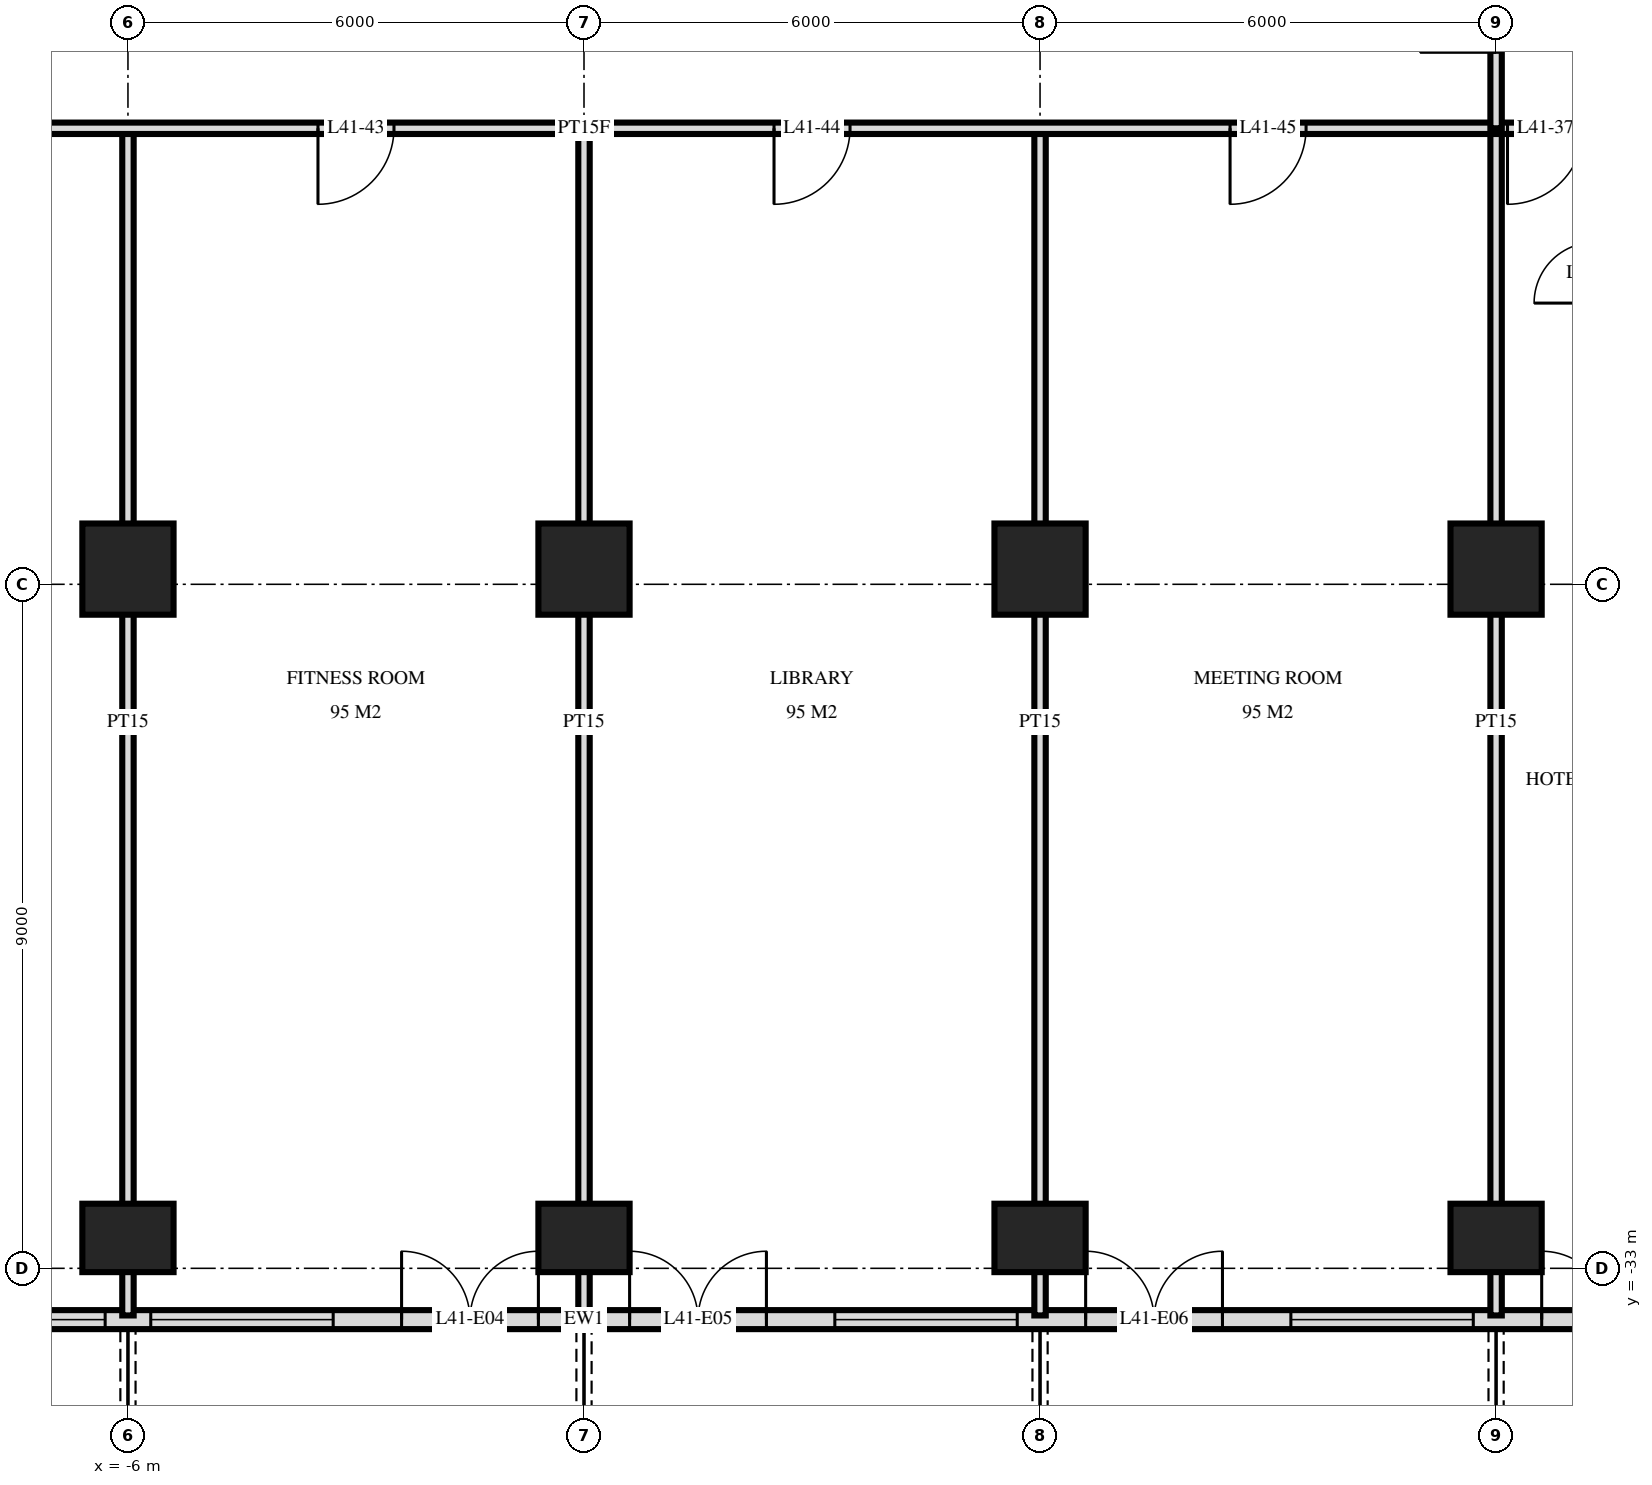
"""IFC4 building model, lengths in metres.
Left out: names, types, materials, properties, quantities, classifications, styles, units other than length and angle.
Written with IfcOpenShell. Run it as: python <this file> out.ifc"""

import sys

from ifc_helpers import new_model, si_unit, direction, frame, frame_2d, origin, origin_2d, place, context, subcontext, project, spatial, rectangle, extrude, element, fill, save


model = new_model("IFC4")
c1 = context("Model", 3, precision=1e-05, world=origin(), true_north=direction((0.0, 1.0)))
c2 = subcontext(c1, "Body", "Model", "MODEL_VIEW")
j1 = project(units=[si_unit("LENGTHUNIT", "METRE"), si_unit("PLANEANGLEUNIT", "RADIAN")], contexts=[c1])
p1 = place(None, origin())
s1 = spatial("IfcSite", under=j1, at=p1, CompositionType="ELEMENT")
p2 = place(p1, origin())
s2 = spatial("IfcBuilding", under=s1, at=p2, CompositionType="ELEMENT")
p3 = place(p2, frame((0.0, 0.0, 159.6)))
s3 = spatial("IfcBuildingStorey", under=s2, at=p3, CompositionType="ELEMENT", Elevation=159.6)
p4 = place(p3, frame((-6.0, -32.6, 0.0), z_axis=(0.0, 0.0, 1.0), x_axis=(1.0, 0.0, 0.0)))
e1 = element("IfcColumn", 1, at=p4, inside=s3, PredefinedType="COLUMN", context=c2, shape_type="SweptSolid", body=[
    extrude(rectangle(XDim=1.2, YDim=0.9, at=origin_2d()), origin(), (0.0, 0.0, 1.0), 3.6),
])
p5 = place(p3, frame((-6.0, -23.8, 0.0), z_axis=(0.0, 0.0, 1.0), x_axis=(1.0, 0.0, 0.0)))
e2 = element("IfcColumn", 2, at=p5, inside=s3, PredefinedType="COLUMN", context=c2, shape_type="SweptSolid", body=[
    extrude(rectangle(XDim=1.2, YDim=1.2, at=origin_2d()), origin(), (0.0, 0.0, 1.0), 3.6),
])
p6 = place(p3, frame((0.0, -32.6, 0.0), z_axis=(0.0, 0.0, 1.0), x_axis=(1.0, 0.0, 0.0)))
e3 = element("IfcColumn", 3, at=p6, inside=s3, PredefinedType="COLUMN", context=c2, shape_type="SweptSolid", body=[
    extrude(rectangle(XDim=1.2, YDim=0.9, at=origin_2d()), origin(), (0.0, 0.0, 1.0), 3.6),
])
p7 = place(p3, frame((0.0, -23.8, 0.0), z_axis=(0.0, 0.0, 1.0), x_axis=(1.0, 0.0, 0.0)))
e4 = element("IfcColumn", 4, at=p7, inside=s3, PredefinedType="COLUMN", context=c2, shape_type="SweptSolid", body=[
    extrude(rectangle(XDim=1.2, YDim=1.2, at=origin_2d()), origin(), (0.0, 0.0, 1.0), 3.6),
])
p8 = place(p3, frame((6.0, -32.6, 0.0), z_axis=(0.0, 0.0, 1.0), x_axis=(1.0, 0.0, 0.0)))
e5 = element("IfcColumn", 5, at=p8, inside=s3, PredefinedType="COLUMN", context=c2, shape_type="SweptSolid", body=[
    extrude(rectangle(XDim=1.2, YDim=0.9, at=origin_2d()), origin(), (0.0, 0.0, 1.0), 3.6),
])
p9 = place(p3, frame((6.0, -23.8, 0.0), z_axis=(0.0, 0.0, 1.0), x_axis=(1.0, 0.0, 0.0)))
e6 = element("IfcColumn", 6, at=p9, inside=s3, PredefinedType="COLUMN", context=c2, shape_type="SweptSolid", body=[
    extrude(rectangle(XDim=1.2, YDim=1.2, at=origin_2d()), origin(), (0.0, 0.0, 1.0), 3.6),
])
p10 = place(p3, frame((12.0, -32.6, 0.0), z_axis=(0.0, 0.0, 1.0), x_axis=(1.0, 0.0, 0.0)))
e7 = element("IfcColumn", 7, at=p10, inside=s3, PredefinedType="COLUMN", context=c2, shape_type="SweptSolid", body=[
    extrude(rectangle(XDim=1.2, YDim=0.9, at=origin_2d()), origin(), (0.0, 0.0, 1.0), 3.6),
])
p11 = place(p3, frame((12.0, -23.8, 0.0), z_axis=(0.0, 0.0, 1.0), x_axis=(1.0, 0.0, 0.0)))
e8 = element("IfcColumn", 8, at=p11, inside=s3, PredefinedType="COLUMN", context=c2, shape_type="SweptSolid", body=[
    extrude(rectangle(XDim=1.2, YDim=1.2, at=origin_2d()), origin(), (0.0, 0.0, 1.0), 3.6),
])
p12 = place(p3, frame((-23.675, -33.675, 0.0), z_axis=(0.0, 0.0, 1.0), x_axis=(1.0, 0.0, 0.0)))
e9 = element("IfcWall", 9, at=p12, inside=s3, PredefinedType="SOLIDWALL", context=c2, shape_type="SweptSolid", body=[
    extrude(rectangle(XDim=47.351, YDim=0.25, at=frame_2d((23.675, 0.0))), origin(), (0.0, 0.0, 1.0), 3.32),
])
p13 = place(p12, frame((0.575, 0.0, 0.0)))
e10 = element("IfcOpeningElement", 10, at=p13, cuts=e9, PredefinedType="OPENING", context=c2, shape_type="SweptSolid", body=[
    extrude(rectangle(XDim=1.8, YDim=2.4, at=frame_2d((0.9, 1.2))), frame((0.0, 0.135, 0.0), z_axis=(0.0, -1.0, 0.0), x_axis=(1.0, 0.0, 0.0)), (0.0, 0.0, 1.0), 0.27),
])
p14 = place(p12, frame((3.425, 0.0, 0.3)))
e11 = element("IfcOpeningElement", 11, at=p14, cuts=e9, PredefinedType="OPENING", context=c2, shape_type="SweptSolid", body=[
    extrude(rectangle(XDim=1.8, YDim=2.1, at=frame_2d((0.9, 1.05))), frame((0.0, 0.135, 0.0), z_axis=(0.0, -1.0, 0.0), x_axis=(1.0, 0.0, 0.0)), (0.0, 0.0, 1.0), 0.27),
])
p15 = place(p12, frame((5.975, 0.0, 0.3)))
e12 = element("IfcOpeningElement", 12, at=p15, cuts=e9, PredefinedType="OPENING", context=c2, shape_type="SweptSolid", body=[
    extrude(rectangle(XDim=2.4, YDim=2.1, at=frame_2d((1.2, 1.05))), frame((0.0, 0.135, 0.0), z_axis=(0.0, -1.0, 0.0), x_axis=(1.0, 0.0, 0.0)), (0.0, 0.0, 1.0), 0.27),
])
p16 = place(p12, frame((9.275, 0.0, 0.0)))
e13 = element("IfcOpeningElement", 13, at=p16, cuts=e9, PredefinedType="OPENING", context=c2, shape_type="SweptSolid", body=[
    extrude(rectangle(XDim=1.8, YDim=2.4, at=frame_2d((0.9, 1.2))), frame((0.0, 0.135, 0.0), z_axis=(0.0, -1.0, 0.0), x_axis=(1.0, 0.0, 0.0)), (0.0, 0.0, 1.0), 0.27),
])
p17 = place(p12, frame((12.275, 0.0, 0.0)))
e14 = element("IfcOpeningElement", 14, at=p17, cuts=e9, PredefinedType="OPENING", context=c2, shape_type="SweptSolid", body=[
    extrude(rectangle(XDim=1.8, YDim=2.4, at=frame_2d((0.9, 1.2))), frame((0.0, 0.135, 0.0), z_axis=(0.0, -1.0, 0.0), x_axis=(1.0, 0.0, 0.0)), (0.0, 0.0, 1.0), 0.27),
])
p18 = place(p12, frame((14.975, 0.0, 0.3)))
e15 = element("IfcOpeningElement", 15, at=p18, cuts=e9, PredefinedType="OPENING", context=c2, shape_type="SweptSolid", body=[
    extrude(rectangle(XDim=2.4, YDim=2.1, at=frame_2d((1.2, 1.05))), frame((0.0, 0.135, 0.0), z_axis=(0.0, -1.0, 0.0), x_axis=(1.0, 0.0, 0.0)), (0.0, 0.0, 1.0), 0.27),
])
p19 = place(p12, frame((17.975, 0.0, 0.3)))
e16 = element("IfcOpeningElement", 16, at=p19, cuts=e9, PredefinedType="OPENING", context=c2, shape_type="SweptSolid", body=[
    extrude(rectangle(XDim=2.4, YDim=2.1, at=frame_2d((1.2, 1.05))), frame((0.0, 0.135, 0.0), z_axis=(0.0, -1.0, 0.0), x_axis=(1.0, 0.0, 0.0)), (0.0, 0.0, 1.0), 0.27),
])
p20 = place(p12, frame((21.275, 0.0, 0.0)))
e17 = element("IfcOpeningElement", 17, at=p20, cuts=e9, PredefinedType="OPENING", context=c2, shape_type="SweptSolid", body=[
    extrude(rectangle(XDim=1.8, YDim=2.4, at=frame_2d((0.9, 1.2))), frame((0.0, 0.135, 0.0), z_axis=(0.0, -1.0, 0.0), x_axis=(1.0, 0.0, 0.0)), (0.0, 0.0, 1.0), 0.27),
])
p21 = place(p12, frame((24.275, 0.0, 0.0)))
e18 = element("IfcOpeningElement", 18, at=p21, cuts=e9, PredefinedType="OPENING", context=c2, shape_type="SweptSolid", body=[
    extrude(rectangle(XDim=1.8, YDim=2.4, at=frame_2d((0.9, 1.2))), frame((0.0, 0.135, 0.0), z_axis=(0.0, -1.0, 0.0), x_axis=(1.0, 0.0, 0.0)), (0.0, 0.0, 1.0), 0.27),
])
p22 = place(p12, frame((26.975, 0.0, 0.3)))
e19 = element("IfcOpeningElement", 19, at=p22, cuts=e9, PredefinedType="OPENING", context=c2, shape_type="SweptSolid", body=[
    extrude(rectangle(XDim=2.4, YDim=2.1, at=frame_2d((1.2, 1.05))), frame((0.0, 0.135, 0.0), z_axis=(0.0, -1.0, 0.0), x_axis=(1.0, 0.0, 0.0)), (0.0, 0.0, 1.0), 0.27),
])
p23 = place(p12, frame((30.275, 0.0, 0.0)))
e20 = element("IfcOpeningElement", 20, at=p23, cuts=e9, PredefinedType="OPENING", context=c2, shape_type="SweptSolid", body=[
    extrude(rectangle(XDim=1.8, YDim=2.4, at=frame_2d((0.9, 1.2))), frame((0.0, 0.135, 0.0), z_axis=(0.0, -1.0, 0.0), x_axis=(1.0, 0.0, 0.0)), (0.0, 0.0, 1.0), 0.27),
])
p24 = place(p12, frame((32.975, 0.0, 0.3)))
e21 = element("IfcOpeningElement", 21, at=p24, cuts=e9, PredefinedType="OPENING", context=c2, shape_type="SweptSolid", body=[
    extrude(rectangle(XDim=2.4, YDim=2.1, at=frame_2d((1.2, 1.05))), frame((0.0, 0.135, 0.0), z_axis=(0.0, -1.0, 0.0), x_axis=(1.0, 0.0, 0.0)), (0.0, 0.0, 1.0), 0.27),
])
p25 = place(p12, frame((36.275, 0.0, 0.0)))
e22 = element("IfcOpeningElement", 22, at=p25, cuts=e9, PredefinedType="OPENING", context=c2, shape_type="SweptSolid", body=[
    extrude(rectangle(XDim=1.8, YDim=2.4, at=frame_2d((0.9, 1.2))), frame((0.0, 0.135, 0.0), z_axis=(0.0, -1.0, 0.0), x_axis=(1.0, 0.0, 0.0)), (0.0, 0.0, 1.0), 0.27),
])
p26 = place(p12, frame((38.975, 0.0, 0.3)))
e23 = element("IfcOpeningElement", 23, at=p26, cuts=e9, PredefinedType="OPENING", context=c2, shape_type="SweptSolid", body=[
    extrude(rectangle(XDim=2.4, YDim=2.1, at=frame_2d((1.2, 1.05))), frame((0.0, 0.135, 0.0), z_axis=(0.0, -1.0, 0.0), x_axis=(1.0, 0.0, 0.0)), (0.0, 0.0, 1.0), 0.27),
])
p27 = place(p12, frame((41.975, 0.0, 0.3)))
e24 = element("IfcOpeningElement", 24, at=p27, cuts=e9, PredefinedType="OPENING", context=c2, shape_type="SweptSolid", body=[
    extrude(rectangle(XDim=2.4, YDim=2.1, at=frame_2d((1.2, 1.05))), frame((0.0, 0.135, 0.0), z_axis=(0.0, -1.0, 0.0), x_axis=(1.0, 0.0, 0.0)), (0.0, 0.0, 1.0), 0.27),
])
p28 = place(p12, frame((45.125, 0.0, 0.0)))
e25 = element("IfcOpeningElement", 25, at=p28, cuts=e9, PredefinedType="OPENING", context=c2, shape_type="SweptSolid", body=[
    extrude(rectangle(XDim=1.8, YDim=2.4, at=frame_2d((0.9, 1.2))), frame((0.0, 0.135, 0.0), z_axis=(0.0, -1.0, 0.0), x_axis=(1.0, 0.0, 0.0)), (0.0, 0.0, 1.0), 0.27),
])
p29 = place(p3, frame((12.0, -18.0, 0.0), z_axis=(0.0, 0.0, 1.0), x_axis=(0.0, 1.0, 0.0)))
e26 = element("IfcWall", 26, at=p29, inside=s3, PredefinedType="PARTITIONING", context=c2, shape_type="SweptSolid", body=[
    extrude(rectangle(XDim=2.95, YDim=0.15, at=frame_2d((1.475, 0.0))), origin(), (0.0, 0.0, 1.0), 3.32),
])
p30 = place(p29, frame((1.0, 0.0, 0.0)))
e27 = element("IfcOpeningElement", 27, at=p30, cuts=e26, PredefinedType="OPENING", context=c2, shape_type="SweptSolid", body=[
    extrude(rectangle(XDim=1.0, YDim=2.1, at=frame_2d((0.5, 1.05))), frame((0.0, 0.085, 0.0), z_axis=(0.0, -1.0, 0.0), x_axis=(1.0, 0.0, 0.0)), (0.0, 0.0, 1.0), 0.17),
])
for number, where, z_axis, x_axis in (
    (28, (12.0, -33.62, 0.0), (0.0, 0.0, 1.0), (0.0, 1.0, 0.0)),
    (29, (6.0, -33.62, 0.0), (0.0, 0.0, 1.0), (0.0, 1.0, 0.0)),
    (30, (0.0, -33.62, 0.0), (0.0, 0.0, 1.0), (0.0, 1.0, 0.0)),
    (31, (-6.0, -33.62, 0.0), (0.0, 0.0, 1.0), (0.0, 1.0, 0.0)),
):
    element("IfcWall", number, at=place(p3, frame(where, z_axis=z_axis, x_axis=x_axis)), inside=s3, PredefinedType="PARTITIONING", context=c2, shape_type="SweptSolid", body=[
        extrude(rectangle(XDim=15.62, YDim=0.15, at=frame_2d((7.81, 0.0))), origin(), (0.0, 0.0, 1.0), 3.32),
    ])
p31 = place(p3, frame((-28.02, -18.0, 0.0), z_axis=(0.0, 0.0, 1.0), x_axis=(1.0, 0.0, 0.0)))
e32 = element("IfcWall", 32, at=p31, inside=s3, PredefinedType="PARTITIONING", context=c2, shape_type="SweptSolid", body=[
    extrude(rectangle(XDim=56.04, YDim=0.15, at=frame_2d((28.02, 0.0))), origin(), (0.0, 0.0, 1.0), 3.32),
])
p32 = place(p31, frame((14.32, 0.0, 0.0)))
e33 = element("IfcOpeningElement", 33, at=p32, cuts=e32, PredefinedType="OPENING", context=c2, shape_type="SweptSolid", body=[
    extrude(rectangle(XDim=1.0, YDim=2.1, at=frame_2d((0.5, 1.05))), frame((0.0, 0.085, 0.0), z_axis=(0.0, -1.0, 0.0), x_axis=(1.0, 0.0, 0.0)), (0.0, 0.0, 1.0), 0.17),
])
p33 = place(p31, frame((40.17, 0.0, 0.0)))
e34 = element("IfcOpeningElement", 34, at=p33, cuts=e32, PredefinedType="OPENING", context=c2, shape_type="SweptSolid", body=[
    extrude(rectangle(XDim=1.0, YDim=2.1, at=frame_2d((0.5, 1.05))), frame((0.0, 0.085, 0.0), z_axis=(0.0, -1.0, 0.0), x_axis=(1.0, 0.0, 0.0)), (0.0, 0.0, 1.0), 0.17),
])
p34 = place(p31, frame((44.87, 0.0, 0.0)))
e35 = element("IfcOpeningElement", 35, at=p34, cuts=e32, PredefinedType="OPENING", context=c2, shape_type="SweptSolid", body=[
    extrude(rectangle(XDim=1.0, YDim=2.1, at=frame_2d((0.5, 1.05))), frame((0.0, 0.085, 0.0), z_axis=(0.0, -1.0, 0.0), x_axis=(1.0, 0.0, 0.0)), (0.0, 0.0, 1.0), 0.17),
])
p35 = place(p31, frame((46.72, 0.0, 0.0)))
e36 = element("IfcOpeningElement", 36, at=p35, cuts=e32, PredefinedType="OPENING", context=c2, shape_type="SweptSolid", body=[
    extrude(rectangle(XDim=1.0, YDim=2.1, at=frame_2d((0.5, 1.05))), frame((0.0, 0.085, 0.0), z_axis=(0.0, -1.0, 0.0), x_axis=(1.0, 0.0, 0.0)), (0.0, 0.0, 1.0), 0.17),
])
p36 = place(p31, frame((18.52, 0.0, 0.0)))
e37 = element("IfcOpeningElement", 37, at=p36, cuts=e32, PredefinedType="OPENING", context=c2, shape_type="SweptSolid", body=[
    extrude(rectangle(XDim=1.0, YDim=2.1, at=frame_2d((0.5, 1.05))), frame((0.0, 0.085, 0.0), z_axis=(0.0, -1.0, 0.0), x_axis=(1.0, 0.0, 0.0)), (0.0, 0.0, 1.0), 0.17),
])
p37 = place(p31, frame((24.52, 0.0, 0.0)))
e38 = element("IfcOpeningElement", 38, at=p37, cuts=e32, PredefinedType="OPENING", context=c2, shape_type="SweptSolid", body=[
    extrude(rectangle(XDim=1.0, YDim=2.1, at=frame_2d((0.5, 1.05))), frame((0.0, 0.085, 0.0), z_axis=(0.0, -1.0, 0.0), x_axis=(1.0, 0.0, 0.0)), (0.0, 0.0, 1.0), 0.17),
])
p38 = place(p31, frame((30.52, 0.0, 0.0)))
e39 = element("IfcOpeningElement", 39, at=p38, cuts=e32, PredefinedType="OPENING", context=c2, shape_type="SweptSolid", body=[
    extrude(rectangle(XDim=1.0, YDim=2.1, at=frame_2d((0.5, 1.05))), frame((0.0, 0.085, 0.0), z_axis=(0.0, -1.0, 0.0), x_axis=(1.0, 0.0, 0.0)), (0.0, 0.0, 1.0), 0.17),
])
p39 = place(p31, frame((36.52, 0.0, 0.0)))
e40 = element("IfcOpeningElement", 40, at=p39, cuts=e32, PredefinedType="OPENING", context=c2, shape_type="SweptSolid", body=[
    extrude(rectangle(XDim=1.0, YDim=2.1, at=frame_2d((0.5, 1.05))), frame((0.0, 0.085, 0.0), z_axis=(0.0, -1.0, 0.0), x_axis=(1.0, 0.0, 0.0)), (0.0, 0.0, 1.0), 0.17),
])
p40 = place(p18, origin())
e41 = element("IfcWindow", 41, at=p40, inside=s3, PartitioningType="SINGLE_PANEL", PredefinedType="WINDOW", context=c2, shape_type="SweptSolid", body=[
    extrude(rectangle(XDim=2.4, YDim=2.1, at=frame_2d((1.2, 1.05))), frame((0.0, 0.03, 0.0), z_axis=(0.0, -1.0, 0.0), x_axis=(1.0, 0.0, 0.0)), (0.0, 0.0, 1.0), 0.06),
])
fill(e15, e41)
p41 = place(p19, origin())
e42 = element("IfcWindow", 42, at=p41, inside=s3, PartitioningType="SINGLE_PANEL", PredefinedType="WINDOW", context=c2, shape_type="SweptSolid", body=[
    extrude(rectangle(XDim=2.4, YDim=2.1, at=frame_2d((1.2, 1.05))), frame((0.0, 0.03, 0.0), z_axis=(0.0, -1.0, 0.0), x_axis=(1.0, 0.0, 0.0)), (0.0, 0.0, 1.0), 0.06),
])
fill(e16, e42)
p42 = place(p20, origin())
e43 = element("IfcDoor", 43, at=p42, inside=s3, OperationType="DOUBLE_DOOR_SINGLE_SWING", PredefinedType="DOOR", context=c2, shape_type="SweptSolid", body=[
    extrude(rectangle(XDim=1.8, YDim=2.4, at=frame_2d((0.9, 1.2))), frame((0.0, 0.025, 0.0), z_axis=(0.0, -1.0, 0.0), x_axis=(1.0, 0.0, 0.0)), (0.0, 0.0, 1.0), 0.05),
])
fill(e17, e43)
p43 = place(p21, origin())
e44 = element("IfcDoor", 44, at=p43, inside=s3, OperationType="DOUBLE_DOOR_SINGLE_SWING", PredefinedType="DOOR", context=c2, shape_type="SweptSolid", body=[
    extrude(rectangle(XDim=1.8, YDim=2.4, at=frame_2d((0.9, 1.2))), frame((0.0, 0.025, 0.0), z_axis=(0.0, -1.0, 0.0), x_axis=(1.0, 0.0, 0.0)), (0.0, 0.0, 1.0), 0.05),
])
fill(e18, e44)
p44 = place(p22, origin())
e45 = element("IfcWindow", 45, at=p44, inside=s3, PartitioningType="SINGLE_PANEL", PredefinedType="WINDOW", context=c2, shape_type="SweptSolid", body=[
    extrude(rectangle(XDim=2.4, YDim=2.1, at=frame_2d((1.2, 1.05))), frame((0.0, 0.03, 0.0), z_axis=(0.0, -1.0, 0.0), x_axis=(1.0, 0.0, 0.0)), (0.0, 0.0, 1.0), 0.06),
])
fill(e19, e45)
p45 = place(p23, origin())
e46 = element("IfcDoor", 46, at=p45, inside=s3, OperationType="DOUBLE_DOOR_SINGLE_SWING", PredefinedType="DOOR", context=c2, shape_type="SweptSolid", body=[
    extrude(rectangle(XDim=1.8, YDim=2.4, at=frame_2d((0.9, 1.2))), frame((0.0, 0.025, 0.0), z_axis=(0.0, -1.0, 0.0), x_axis=(1.0, 0.0, 0.0)), (0.0, 0.0, 1.0), 0.05),
])
fill(e20, e46)
p46 = place(p24, origin())
e47 = element("IfcWindow", 47, at=p46, inside=s3, PartitioningType="SINGLE_PANEL", PredefinedType="WINDOW", context=c2, shape_type="SweptSolid", body=[
    extrude(rectangle(XDim=2.4, YDim=2.1, at=frame_2d((1.2, 1.05))), frame((0.0, 0.03, 0.0), z_axis=(0.0, -1.0, 0.0), x_axis=(1.0, 0.0, 0.0)), (0.0, 0.0, 1.0), 0.06),
])
fill(e21, e47)
p47 = place(p25, origin())
e48 = element("IfcDoor", 48, at=p47, inside=s3, OperationType="DOUBLE_DOOR_SINGLE_SWING", PredefinedType="DOOR", context=c2, shape_type="SweptSolid", body=[
    extrude(rectangle(XDim=1.8, YDim=2.4, at=frame_2d((0.9, 1.2))), frame((0.0, 0.025, 0.0), z_axis=(0.0, -1.0, 0.0), x_axis=(1.0, 0.0, 0.0)), (0.0, 0.0, 1.0), 0.05),
])
fill(e22, e48)
p48 = place(p33, frame((0.5, 0.0, 0.0), z_axis=(0.0, 0.0, 1.0), x_axis=(-1.0, 0.0, 0.0)))
e49 = element("IfcDoor", 49, at=p48, inside=s3, OperationType="SINGLE_SWING_LEFT", PredefinedType="DOOR", context=c2, shape_type="SweptSolid", body=[
    extrude(rectangle(XDim=1.0, YDim=2.1, at=frame_2d((0.0, 1.05))), frame((0.0, -0.025, 0.0), z_axis=(0.0, 1.0, 0.0), x_axis=(-1.0, 0.0, 0.0)), (0.0, 0.0, 1.0), 0.05),
])
fill(e34, e49)
p49 = place(p37, frame((0.5, 0.0, 0.0), z_axis=(0.0, 0.0, 1.0), x_axis=(-1.0, 0.0, 0.0)))
e50 = element("IfcDoor", 50, at=p49, inside=s3, OperationType="SINGLE_SWING_LEFT", PredefinedType="DOOR", context=c2, shape_type="SweptSolid", body=[
    extrude(rectangle(XDim=1.0, YDim=2.1, at=frame_2d((0.0, 1.05))), frame((0.0, -0.025, 0.0), z_axis=(0.0, 1.0, 0.0), x_axis=(-1.0, 0.0, 0.0)), (0.0, 0.0, 1.0), 0.05),
])
fill(e38, e50)
p50 = place(p38, frame((0.5, 0.0, 0.0), z_axis=(0.0, 0.0, 1.0), x_axis=(-1.0, 0.0, 0.0)))
e51 = element("IfcDoor", 51, at=p50, inside=s3, OperationType="SINGLE_SWING_LEFT", PredefinedType="DOOR", context=c2, shape_type="SweptSolid", body=[
    extrude(rectangle(XDim=1.0, YDim=2.1, at=frame_2d((0.0, 1.05))), frame((0.0, -0.025, 0.0), z_axis=(0.0, 1.0, 0.0), x_axis=(-1.0, 0.0, 0.0)), (0.0, 0.0, 1.0), 0.05),
])
fill(e39, e51)
p51 = place(p39, frame((0.5, 0.0, 0.0), z_axis=(0.0, 0.0, 1.0), x_axis=(-1.0, 0.0, 0.0)))
e52 = element("IfcDoor", 52, at=p51, inside=s3, OperationType="SINGLE_SWING_LEFT", PredefinedType="DOOR", context=c2, shape_type="SweptSolid", body=[
    extrude(rectangle(XDim=1.0, YDim=2.1, at=frame_2d((0.0, 1.05))), frame((0.0, -0.025, 0.0), z_axis=(0.0, 1.0, 0.0), x_axis=(-1.0, 0.0, 0.0)), (0.0, 0.0, 1.0), 0.05),
])
fill(e40, e52)
save(model, sys.argv[1])
